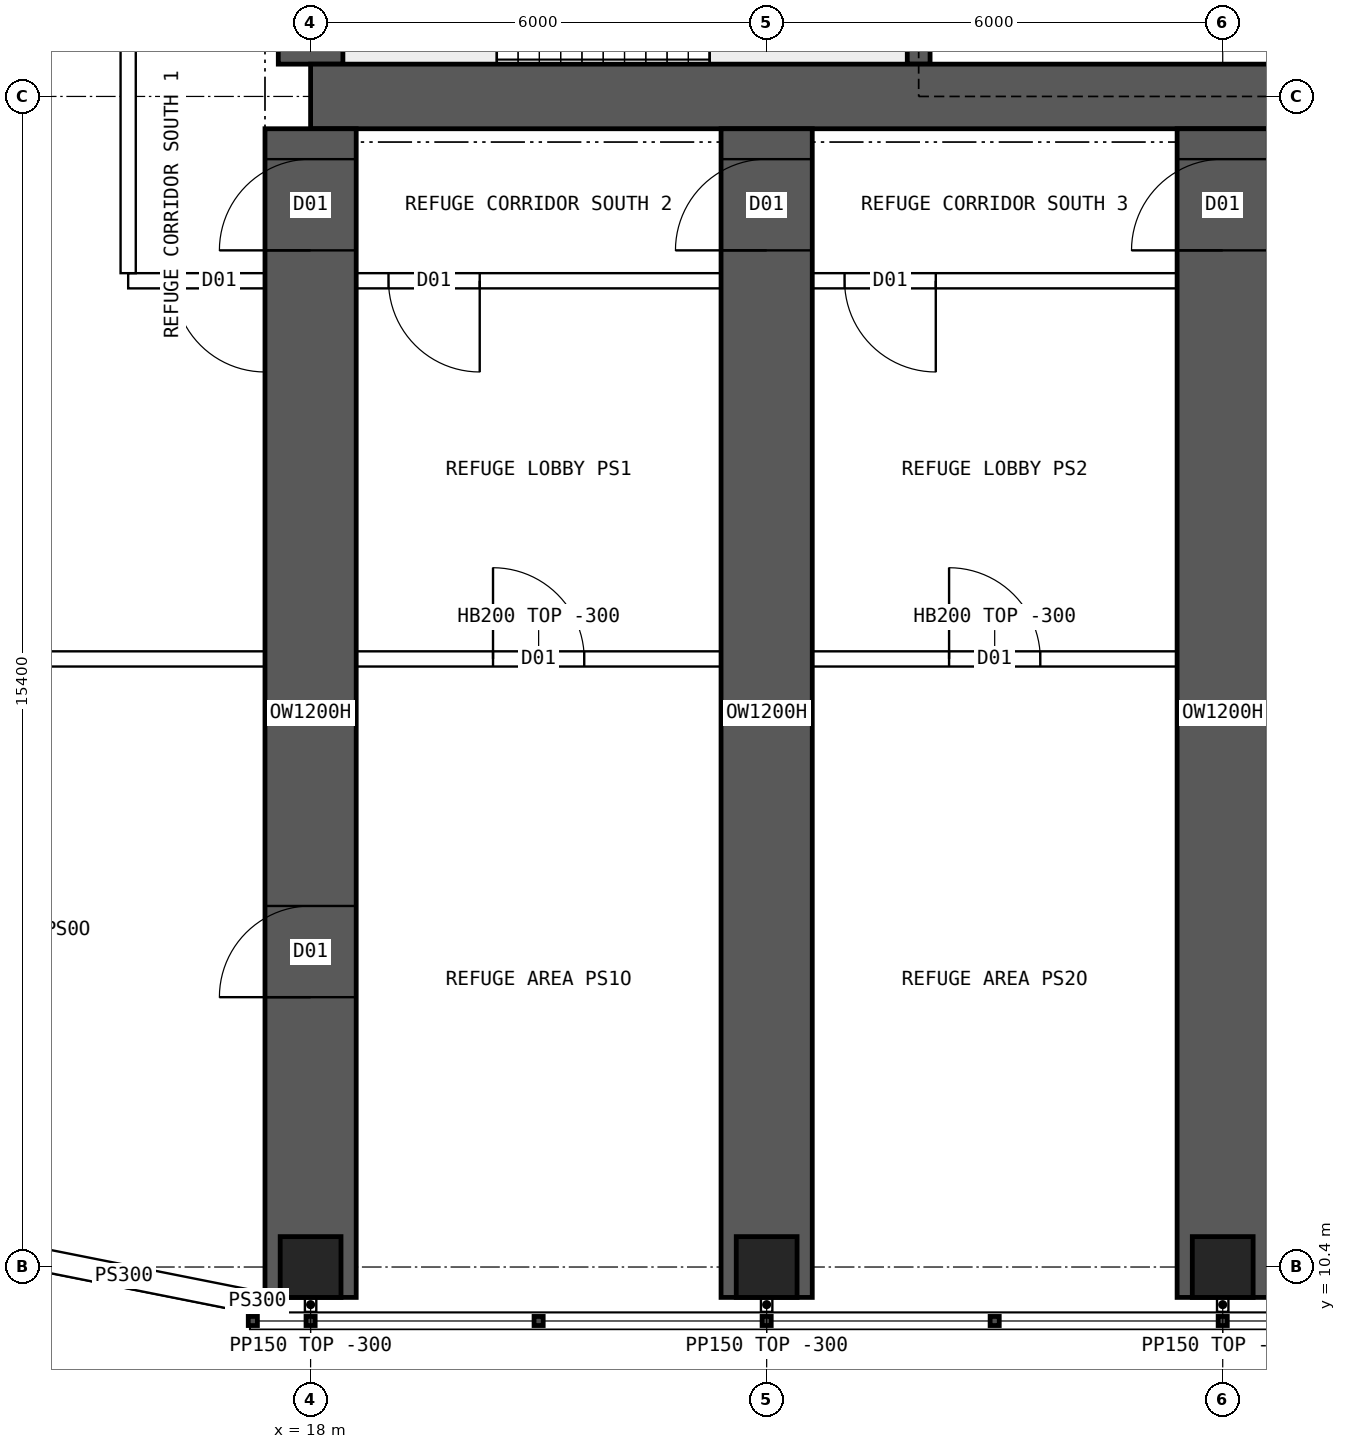
"""IFC4 building model, lengths in metres.
Left out: names, types, materials, properties, quantities, classifications, styles, units other than length and angle.
Written with IfcOpenShell. Run it as: python <this file> out.ifc"""

import sys

from ifc_helpers import new_model, si_unit, direction, frame, frame_2d, origin, origin_2d, place, context, subcontext, project, spatial, polyline, rectangle, hollow_rectangle, outline, extrude, clip, halfspace, element, fill, save


model = new_model("IFC4")
c1 = context("Model", 3, precision=1e-05, world=origin(), true_north=direction((0.0, 1.0)))
c2 = subcontext(c1, "Body", "Model", "MODEL_VIEW")
j1 = project(units=[si_unit("LENGTHUNIT", "METRE"), si_unit("PLANEANGLEUNIT", "RADIAN")], contexts=[c1])
p1 = place(None, origin())
s1 = spatial("IfcSite", under=j1, at=p1, CompositionType="ELEMENT")
p2 = place(p1, origin())
s2 = spatial("IfcBuilding", under=s1, at=p2, CompositionType="ELEMENT")
p3 = place(p2, frame((0.0, 0.0, 201.1)))
s3 = spatial("IfcBuildingStorey", under=s2, at=p3, CompositionType="ELEMENT", Elevation=201.1)
for number, where, z_axis, x_axis in (
    (1, (18.0, 10.4, 0.0), (0.0, 0.0, 1.0), (1.0, 0.0, 0.0)),
    (2, (24.0, 10.4, 0.0), (0.0, 0.0, 1.0), (1.0, 0.0, 0.0)),
    (3, (30.0, 10.4, 0.0), (0.0, 0.0, 1.0), (1.0, 0.0, 0.0)),
):
    element("IfcColumn", number, at=place(p3, frame(where, z_axis=z_axis, x_axis=x_axis)), inside=s3, PredefinedType="COLUMN", context=c2, shape_type="SweptSolid", body=[
        extrude(hollow_rectangle(XDim=0.8, YDim=0.8, WallThickness=0.08, at=origin_2d()), origin(), (0.0, 0.0, 1.0), 7.2),
    ])
p4 = place(p3, frame((18.0, 25.8, 0.0), z_axis=(0.0, 0.0, 1.0), x_axis=(1.0, 0.0, 0.0)))
e4 = element("IfcWall", 4, at=p4, inside=s3, PredefinedType="SHEAR", context=c2, shape_type="SweptSolid", body=[
    extrude(rectangle(XDim=48.0, YDim=0.85, at=frame_2d((24.0, 0.0))), origin(), (0.0, 0.0, 1.0), 7.2),
])
p5 = place(p3, frame((18.0, 26.225, 0.0), z_axis=(0.0, 0.0, 1.0), x_axis=(0.0, 1.0, 0.0)))
e5 = element("IfcWall", 5, at=p5, inside=s3, PredefinedType="SHEAR", context=c2, shape_type="SweptSolid", body=[
    extrude(rectangle(XDim=11.55, YDim=0.85, at=frame_2d((5.775, 0.0))), origin(), (0.0, 0.0, 1.0), 7.2),
])
p6 = place(p5, frame((5.075, 0.0, 0.0)))
e6 = element("IfcOpeningElement", 6, at=p6, cuts=e5, PredefinedType="OPENING", context=c2, shape_type="SweptSolid", body=[
    extrude(rectangle(XDim=1.2, YDim=2.1, at=frame_2d((0.6, 1.05))), frame((0.0, 0.435, 0.0), z_axis=(0.0, -1.0, 0.0), x_axis=(1.0, 0.0, 0.0)), (0.0, 0.0, 1.0), 0.87),
])
p7 = place(p3, frame((26.0, 26.225, 0.0), z_axis=(0.0, 0.0, 1.0), x_axis=(0.0, 1.0, 0.0)))
e7 = element("IfcWall", 7, at=p7, inside=s3, PredefinedType="SHEAR", context=c2, shape_type="SweptSolid", body=[
    extrude(rectangle(XDim=4.025, YDim=0.3, at=frame_2d((2.012, 0.0))), origin(), (0.0, 0.0, 1.0), 7.2),
])
p8 = place(p3, frame((18.0, 10.0, 0.0), z_axis=(0.0, 0.0, 1.0), x_axis=(0.0, 1.0, 0.0)))
e8 = element("IfcWall", 8, at=p8, inside=s3, PredefinedType="SHEAR", context=c2, shape_type="SweptSolid", body=[
    extrude(rectangle(XDim=15.375, YDim=1.2, at=frame_2d((7.688, 0.0))), origin(), (0.0, 0.0, 1.0), 7.2),
])
p9 = place(p8, frame((13.775, 0.0, 0.0)))
e9 = element("IfcOpeningElement", 9, at=p9, cuts=e8, PredefinedType="OPENING", context=c2, shape_type="SweptSolid", body=[
    extrude(rectangle(XDim=1.2, YDim=2.1, at=frame_2d((0.6, 1.05))), frame((0.0, 0.61, 0.0), z_axis=(0.0, -1.0, 0.0), x_axis=(1.0, 0.0, 0.0)), (0.0, 0.0, 1.0), 1.22),
])
p10 = place(p8, frame((3.95, 0.0, 0.0)))
e10 = element("IfcOpeningElement", 10, at=p10, cuts=e8, PredefinedType="OPENING", context=c2, shape_type="SweptSolid", body=[
    extrude(rectangle(XDim=1.2, YDim=2.1, at=frame_2d((0.6, 1.05))), frame((0.0, 0.61, 0.0), z_axis=(0.0, -1.0, 0.0), x_axis=(1.0, 0.0, 0.0)), (0.0, 0.0, 1.0), 1.22),
])
p11 = place(p3, frame((24.0, 10.0, 0.0), z_axis=(0.0, 0.0, 1.0), x_axis=(0.0, 1.0, 0.0)))
e11 = element("IfcWall", 11, at=p11, inside=s3, PredefinedType="SHEAR", context=c2, shape_type="SweptSolid", body=[
    extrude(rectangle(XDim=15.375, YDim=1.2, at=frame_2d((7.688, 0.0))), origin(), (0.0, 0.0, 1.0), 7.2),
])
p12 = place(p11, frame((13.775, 0.0, 0.0)))
e12 = element("IfcOpeningElement", 12, at=p12, cuts=e11, PredefinedType="OPENING", context=c2, shape_type="SweptSolid", body=[
    extrude(rectangle(XDim=1.2, YDim=2.1, at=frame_2d((0.6, 1.05))), frame((0.0, 0.61, 0.0), z_axis=(0.0, -1.0, 0.0), x_axis=(1.0, 0.0, 0.0)), (0.0, 0.0, 1.0), 1.22),
])
p13 = place(p3, frame((30.0, 10.0, 0.0), z_axis=(0.0, 0.0, 1.0), x_axis=(0.0, 1.0, 0.0)))
e13 = element("IfcWall", 13, at=p13, inside=s3, PredefinedType="SHEAR", context=c2, shape_type="SweptSolid", body=[
    extrude(rectangle(XDim=15.375, YDim=1.2, at=frame_2d((7.688, 0.0))), origin(), (0.0, 0.0, 1.0), 7.2),
])
p14 = place(p13, frame((13.775, 0.0, 0.0)))
e14 = element("IfcOpeningElement", 14, at=p14, cuts=e13, PredefinedType="OPENING", context=c2, shape_type="SweptSolid", body=[
    extrude(rectangle(XDim=1.2, YDim=2.1, at=frame_2d((0.6, 1.05))), frame((0.0, 0.61, 0.0), z_axis=(0.0, -1.0, 0.0), x_axis=(1.0, 0.0, 0.0)), (0.0, 0.0, 1.0), 1.22),
])
p15 = place(p3, frame((13.89, 10.608, 0.0), z_axis=(0.0, 0.0, 1.0), x_axis=(0.98078325777, -0.195100490205, 0.0)))
e15 = element("IfcWall", 15, at=p15, inside=s3, PredefinedType="SOLIDWALL", context=c2, shape_type="SweptSolid", body=[
    extrude(outline(polyline([(-0.03, -0.15), (3.405, -0.15), (3.345, 0.15), (0.03, 0.15), (-0.03, -0.15)])), origin(), (0.0, 0.0, 1.0), 6.9),
])
p16 = place(p3, frame((17.2, 9.95, 0.0), z_axis=(0.0, 0.0, 1.0), x_axis=(1.0, 0.0, 0.0)))
e16 = element("IfcWall", 16, at=p16, inside=s3, PredefinedType="SOLIDWALL", context=c2, shape_type="SweptSolid", body=[
    extrude(rectangle(XDim=0.2, YDim=0.3, at=frame_2d((0.1, 0.0))), origin(), (0.0, 0.0, 1.0), 6.9),
])
p17 = place(p3, frame((68.4, 23.375, 0.0), z_axis=(0.0, 0.0, 1.0), x_axis=(-1.0, 0.0, 0.0)))
e17 = element("IfcWall", 17, at=p17, inside=s3, PredefinedType="SOLIDWALL", context=c2, shape_type="SweptSolid", body=[
    extrude(rectangle(XDim=52.8, YDim=0.2, at=frame_2d((26.4, 0.0))), origin(), (0.0, 0.0, 1.0), 6.9),
])
p18 = place(p17, frame((51.0, 0.0, 0.0)))
e18 = element("IfcOpeningElement", 18, at=p18, cuts=e17, PredefinedType="OPENING", context=c2, shape_type="SweptSolid", body=[
    extrude(rectangle(XDim=1.2, YDim=2.1, at=frame_2d((0.6, 1.05))), frame((0.0, 0.11, 0.0), z_axis=(0.0, -1.0, 0.0), x_axis=(1.0, 0.0, 0.0)), (0.0, 0.0, 1.0), 0.22),
])
p19 = place(p17, frame((48.175, 0.0, 0.0)))
e19 = element("IfcOpeningElement", 19, at=p19, cuts=e17, PredefinedType="OPENING", context=c2, shape_type="SweptSolid", body=[
    extrude(rectangle(XDim=1.2, YDim=2.1, at=frame_2d((0.6, 1.05))), frame((0.0, 0.11, 0.0), z_axis=(0.0, -1.0, 0.0), x_axis=(1.0, 0.0, 0.0)), (0.0, 0.0, 1.0), 0.22),
])
p20 = place(p17, frame((42.175, 0.0, 0.0)))
e20 = element("IfcOpeningElement", 20, at=p20, cuts=e17, PredefinedType="OPENING", context=c2, shape_type="SweptSolid", body=[
    extrude(rectangle(XDim=1.2, YDim=2.1, at=frame_2d((0.6, 1.05))), frame((0.0, 0.11, 0.0), z_axis=(0.0, -1.0, 0.0), x_axis=(1.0, 0.0, 0.0)), (0.0, 0.0, 1.0), 0.22),
])
p21 = place(p17, frame((36.175, 0.0, 0.0)))
e21 = element("IfcOpeningElement", 21, at=p21, cuts=e17, PredefinedType="OPENING", context=c2, shape_type="SweptSolid", body=[
    extrude(rectangle(XDim=1.2, YDim=2.1, at=frame_2d((0.6, 1.05))), frame((0.0, 0.11, 0.0), z_axis=(0.0, -1.0, 0.0), x_axis=(1.0, 0.0, 0.0)), (0.0, 0.0, 1.0), 0.22),
])
p22 = place(p17, frame((30.175, 0.0, 0.0)))
e22 = element("IfcOpeningElement", 22, at=p22, cuts=e17, PredefinedType="OPENING", context=c2, shape_type="SweptSolid", body=[
    extrude(rectangle(XDim=1.2, YDim=2.1, at=frame_2d((0.6, 1.05))), frame((0.0, 0.11, 0.0), z_axis=(0.0, -1.0, 0.0), x_axis=(1.0, 0.0, 0.0)), (0.0, 0.0, 1.0), 0.22),
])
p23 = place(p17, frame((24.175, 0.0, 0.0)))
e23 = element("IfcOpeningElement", 23, at=p23, cuts=e17, PredefinedType="OPENING", context=c2, shape_type="SweptSolid", body=[
    extrude(rectangle(XDim=1.2, YDim=2.1, at=frame_2d((0.6, 1.05))), frame((0.0, 0.11, 0.0), z_axis=(0.0, -1.0, 0.0), x_axis=(1.0, 0.0, 0.0)), (0.0, 0.0, 1.0), 0.22),
])
p24 = place(p17, frame((18.175, 0.0, 0.0)))
e24 = element("IfcOpeningElement", 24, at=p24, cuts=e17, PredefinedType="OPENING", context=c2, shape_type="SweptSolid", body=[
    extrude(rectangle(XDim=1.2, YDim=2.1, at=frame_2d((0.6, 1.05))), frame((0.0, 0.11, 0.0), z_axis=(0.0, -1.0, 0.0), x_axis=(1.0, 0.0, 0.0)), (0.0, 0.0, 1.0), 0.22),
])
p25 = place(p17, frame((12.175, 0.0, 0.0)))
e25 = element("IfcOpeningElement", 25, at=p25, cuts=e17, PredefinedType="OPENING", context=c2, shape_type="SweptSolid", body=[
    extrude(rectangle(XDim=1.2, YDim=2.1, at=frame_2d((0.6, 1.05))), frame((0.0, 0.11, 0.0), z_axis=(0.0, -1.0, 0.0), x_axis=(1.0, 0.0, 0.0)), (0.0, 0.0, 1.0), 0.22),
])
p26 = place(p17, frame((6.175, 0.0, 0.0)))
e26 = element("IfcOpeningElement", 26, at=p26, cuts=e17, PredefinedType="OPENING", context=c2, shape_type="SweptSolid", body=[
    extrude(rectangle(XDim=1.2, YDim=2.1, at=frame_2d((0.6, 1.05))), frame((0.0, 0.11, 0.0), z_axis=(0.0, -1.0, 0.0), x_axis=(1.0, 0.0, 0.0)), (0.0, 0.0, 1.0), 0.22),
])
p27 = place(p17, frame((0.175, 0.0, 0.0)))
e27 = element("IfcOpeningElement", 27, at=p27, cuts=e17, PredefinedType="OPENING", context=c2, shape_type="SweptSolid", body=[
    extrude(rectangle(XDim=1.2, YDim=2.1, at=frame_2d((0.6, 1.05))), frame((0.0, 0.11, 0.0), z_axis=(0.0, -1.0, 0.0), x_axis=(1.0, 0.0, 0.0)), (0.0, 0.0, 1.0), 0.22),
])
p28 = place(p3, frame((15.6, 23.475, 0.0), z_axis=(0.0, 0.0, 1.0), x_axis=(0.0, 1.0, 0.0)))
e28 = element("IfcWall", 28, at=p28, inside=s3, PredefinedType="SOLIDWALL", context=c2, shape_type="SweptSolid", body=[
    extrude(rectangle(XDim=17.05, YDim=0.2, at=frame_2d((8.525, 0.0))), origin(), (0.0, 0.0, 1.0), 6.9),
])
p29 = place(p3, frame((8.748, 18.4, 0.0), z_axis=(0.0, 0.0, 1.0), x_axis=(1.0, 0.0, 0.0)))
e29 = element("IfcWall", 29, at=p29, inside=s3, PredefinedType="SOLIDWALL", context=c2, shape_type="Clipping", body=[
    clip(clip(extrude(outline(polyline([(-0.03, 0.0), (8.857, 0.0), (8.857, 6.9), (3.554, 6.9), (3.552, 6.45), (2.954, 6.45), (2.952, 6.9), (-0.03, 6.9), (-0.03, 0.0)])), frame((0.0, 0.1, 0.0), z_axis=(0.0, -1.0, 0.0), x_axis=(1.0, 0.0, 0.0)), (0.0, 0.0, 1.0), 0.2), halfspace(frame((0.0, 0.0, 0.0), z_axis=(-0.980787601265, -0.195078653892, 0.0)), False)), halfspace(frame((8.827, 0.0, 0.0), z_axis=(1.0, 0.0, 0.0)), False)),
])
p30 = place(p29, frame((3.815, 0.0, 0.0)))
e30 = element("IfcOpeningElement", 30, at=p30, cuts=e29, PredefinedType="OPENING", context=c2, shape_type="SweptSolid", body=[
    extrude(rectangle(XDim=1.2, YDim=2.1, at=frame_2d((0.6, 1.05))), frame((0.0, 0.11, 0.0), z_axis=(0.0, -1.0, 0.0), x_axis=(1.0, 0.0, 0.0)), (0.0, 0.0, 1.0), 0.22),
])
p31 = place(p3, frame((18.425, 18.4, 0.0), z_axis=(0.0, 0.0, 1.0), x_axis=(1.0, 0.0, 0.0)))
e31 = element("IfcWall", 31, at=p31, inside=s3, PredefinedType="SOLIDWALL", context=c2, shape_type="SweptSolid", body=[
    extrude(rectangle(XDim=5.15, YDim=0.2, at=frame_2d((2.575, 0.0))), origin(), (0.0, 0.0, 1.0), 6.9),
])
p32 = place(p31, frame((1.975, 0.0, 0.0)))
e32 = element("IfcOpeningElement", 32, at=p32, cuts=e31, PredefinedType="OPENING", context=c2, shape_type="SweptSolid", body=[
    extrude(rectangle(XDim=1.2, YDim=2.1, at=frame_2d((0.6, 1.05))), frame((0.0, 0.11, 0.0), z_axis=(0.0, -1.0, 0.0), x_axis=(1.0, 0.0, 0.0)), (0.0, 0.0, 1.0), 0.22),
])
p33 = place(p3, frame((24.425, 18.4, 0.0), z_axis=(0.0, 0.0, 1.0), x_axis=(1.0, 0.0, 0.0)))
e33 = element("IfcWall", 33, at=p33, inside=s3, PredefinedType="SOLIDWALL", context=c2, shape_type="SweptSolid", body=[
    extrude(rectangle(XDim=5.15, YDim=0.2, at=frame_2d((2.575, 0.0))), origin(), (0.0, 0.0, 1.0), 6.9),
])
p34 = place(p33, frame((1.975, 0.0, 0.0)))
e34 = element("IfcOpeningElement", 34, at=p34, cuts=e33, PredefinedType="OPENING", context=c2, shape_type="SweptSolid", body=[
    extrude(rectangle(XDim=1.2, YDim=2.1, at=frame_2d((0.6, 1.05))), frame((0.0, 0.11, 0.0), z_axis=(0.0, -1.0, 0.0), x_axis=(1.0, 0.0, 0.0)), (0.0, 0.0, 1.0), 0.22),
])
p35 = place(p3, frame((30.425, 18.4, 0.0), z_axis=(0.0, 0.0, 1.0), x_axis=(1.0, 0.0, 0.0)))
e35 = element("IfcWall", 35, at=p35, inside=s3, PredefinedType="SOLIDWALL", context=c2, shape_type="SweptSolid", body=[
    extrude(rectangle(XDim=5.15, YDim=0.2, at=frame_2d((2.575, 0.0))), origin(), (0.0, 0.0, 1.0), 6.9),
])
p36 = place(p35, frame((1.975, 0.0, 0.0)))
e36 = element("IfcOpeningElement", 36, at=p36, cuts=e35, PredefinedType="OPENING", context=c2, shape_type="SweptSolid", body=[
    extrude(rectangle(XDim=1.2, YDim=2.1, at=frame_2d((0.6, 1.05))), frame((0.0, 0.11, 0.0), z_axis=(0.0, -1.0, 0.0), x_axis=(1.0, 0.0, 0.0)), (0.0, 0.0, 1.0), 0.22),
])
for number, where, z_axis, x_axis in (
    (37, (18.0, 10.0, 0.0), (0.0, 0.0, 1.0), (0.0, -1.0, 0.0)),
    (38, (24.0, 10.0, 0.0), (0.0, 0.0, 1.0), (0.0, -1.0, 0.0)),
    (39, (30.0, 10.0, 0.0), (0.0, 0.0, 1.0), (0.0, -1.0, 0.0)),
):
    element("IfcWall", number, at=place(p3, frame(where, z_axis=z_axis, x_axis=x_axis)), inside=s3, PredefinedType="PARTITIONING", context=c2, shape_type="SweptSolid", body=[
        extrude(rectangle(XDim=0.19, YDim=0.15, at=frame_2d((0.095, 0.0))), origin(), (0.0, 0.0, 1.0), 6.9),
    ])
p37 = place(p32, origin())
e40 = element("IfcDoor", 40, at=p37, inside=s3, OperationType="SINGLE_SWING_LEFT", PredefinedType="DOOR", context=c2, shape_type="SweptSolid", body=[
    extrude(rectangle(XDim=1.2, YDim=2.1, at=frame_2d((0.6, 1.05))), frame((0.0, 0.025, 0.0), z_axis=(0.0, -1.0, 0.0), x_axis=(1.0, 0.0, 0.0)), (0.0, 0.0, 1.0), 0.05),
])
fill(e32, e40)
p38 = place(p34, origin())
e41 = element("IfcDoor", 41, at=p38, inside=s3, OperationType="SINGLE_SWING_LEFT", PredefinedType="DOOR", context=c2, shape_type="SweptSolid", body=[
    extrude(rectangle(XDim=1.2, YDim=2.1, at=frame_2d((0.6, 1.05))), frame((0.0, 0.025, 0.0), z_axis=(0.0, -1.0, 0.0), x_axis=(1.0, 0.0, 0.0)), (0.0, 0.0, 1.0), 0.05),
])
fill(e34, e41)
p39 = place(p18, origin())
e42 = element("IfcDoor", 42, at=p39, inside=s3, OperationType="SINGLE_SWING_LEFT", PredefinedType="DOOR", context=c2, shape_type="SweptSolid", body=[
    extrude(rectangle(XDim=1.2, YDim=2.1, at=frame_2d((0.6, 1.05))), frame((0.0, 0.025, 0.0), z_axis=(0.0, -1.0, 0.0), x_axis=(1.0, 0.0, 0.0)), (0.0, 0.0, 1.0), 0.05),
])
fill(e18, e42)
p40 = place(p19, origin())
e43 = element("IfcDoor", 43, at=p40, inside=s3, OperationType="SINGLE_SWING_LEFT", PredefinedType="DOOR", context=c2, shape_type="SweptSolid", body=[
    extrude(rectangle(XDim=1.2, YDim=2.1, at=frame_2d((0.6, 1.05))), frame((0.0, 0.025, 0.0), z_axis=(0.0, -1.0, 0.0), x_axis=(1.0, 0.0, 0.0)), (0.0, 0.0, 1.0), 0.05),
])
fill(e19, e43)
p41 = place(p20, origin())
e44 = element("IfcDoor", 44, at=p41, inside=s3, OperationType="SINGLE_SWING_LEFT", PredefinedType="DOOR", context=c2, shape_type="SweptSolid", body=[
    extrude(rectangle(XDim=1.2, YDim=2.1, at=frame_2d((0.6, 1.05))), frame((0.0, 0.025, 0.0), z_axis=(0.0, -1.0, 0.0), x_axis=(1.0, 0.0, 0.0)), (0.0, 0.0, 1.0), 0.05),
])
fill(e20, e44)
p42 = place(p9, origin())
e45 = element("IfcDoor", 45, at=p42, inside=s3, OperationType="SINGLE_SWING_LEFT", PredefinedType="DOOR", context=c2, shape_type="SweptSolid", body=[
    extrude(rectangle(XDim=1.2, YDim=2.1, at=frame_2d((0.6, 1.05))), frame((0.0, 0.025, 0.0), z_axis=(0.0, -1.0, 0.0), x_axis=(1.0, 0.0, 0.0)), (0.0, 0.0, 1.0), 0.05),
])
fill(e9, e45)
p43 = place(p12, origin())
e46 = element("IfcDoor", 46, at=p43, inside=s3, OperationType="SINGLE_SWING_LEFT", PredefinedType="DOOR", context=c2, shape_type="SweptSolid", body=[
    extrude(rectangle(XDim=1.2, YDim=2.1, at=frame_2d((0.6, 1.05))), frame((0.0, 0.025, 0.0), z_axis=(0.0, -1.0, 0.0), x_axis=(1.0, 0.0, 0.0)), (0.0, 0.0, 1.0), 0.05),
])
fill(e12, e46)
p44 = place(p14, origin())
e47 = element("IfcDoor", 47, at=p44, inside=s3, OperationType="SINGLE_SWING_LEFT", PredefinedType="DOOR", context=c2, shape_type="SweptSolid", body=[
    extrude(rectangle(XDim=1.2, YDim=2.1, at=frame_2d((0.6, 1.05))), frame((0.0, 0.025, 0.0), z_axis=(0.0, -1.0, 0.0), x_axis=(1.0, 0.0, 0.0)), (0.0, 0.0, 1.0), 0.05),
])
fill(e14, e47)
p45 = place(p10, origin())
e48 = element("IfcDoor", 48, at=p45, inside=s3, OperationType="SINGLE_SWING_LEFT", PredefinedType="DOOR", context=c2, shape_type="SweptSolid", body=[
    extrude(rectangle(XDim=1.2, YDim=2.1, at=frame_2d((0.6, 1.05))), frame((0.0, 0.585, 0.0), z_axis=(0.0, -1.0, 0.0), x_axis=(1.0, 0.0, 0.0)), (0.0, 0.0, 1.0), 0.05),
])
fill(e10, e48)
save(model, sys.argv[1])
